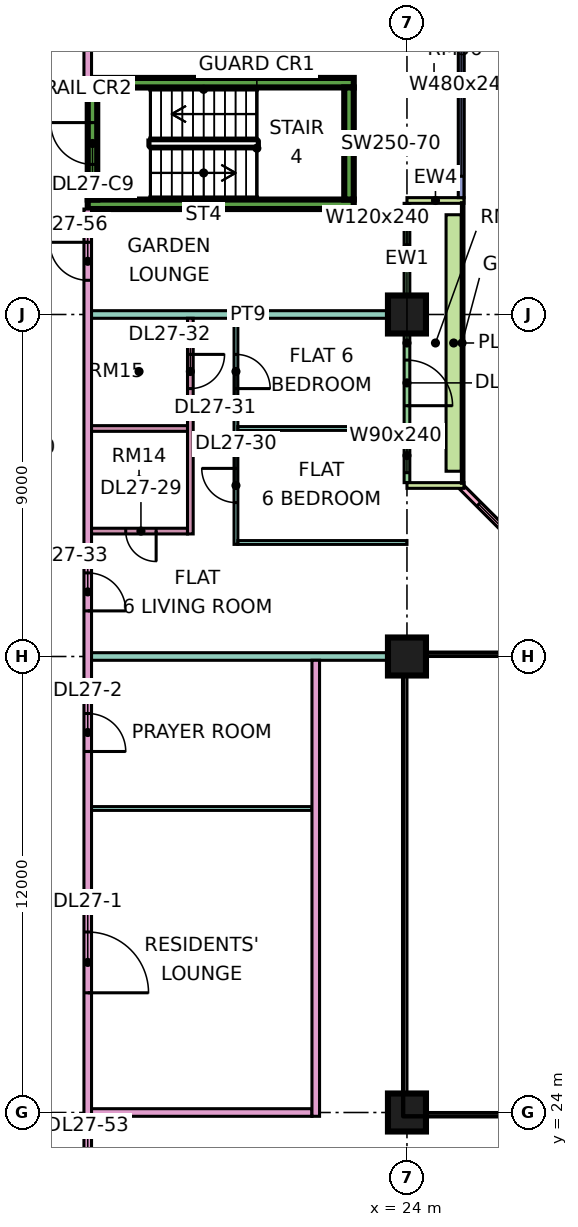
"""IFC4 building model, lengths in metres.
Left out: names, types, materials, properties, quantities, classifications, styles, units other than length and angle.
Written with IfcOpenShell. Run it as: python <this file> out.ifc"""

import sys

from ifc_helpers import new_model, si_unit, direction, frame, frame_2d, origin, origin_2d, place, context, subcontext, project, spatial, rectangle, extrude, element, fill, save


model = new_model("IFC4")
c1 = context("Model", 3, precision=1e-05, world=origin(), true_north=direction((0.0, 1.0)))
c2 = subcontext(c1, "Body", "Model", "MODEL_VIEW")
j1 = project(units=[si_unit("LENGTHUNIT", "METRE"), si_unit("PLANEANGLEUNIT", "RADIAN")], contexts=[c1])
p1 = place(None, origin())
s1 = spatial("IfcSite", under=j1, at=p1, CompositionType="ELEMENT")
p2 = place(p1, origin())
s2 = spatial("IfcBuilding", under=s1, at=p2, CompositionType="ELEMENT")
p3 = place(p2, frame((0.0, 0.0, 118.15)))
s3 = spatial("IfcBuildingStorey", under=s2, at=p3, CompositionType="ELEMENT", Elevation=118.15)
for number, where, z_axis, x_axis in (
    (1, (24.0, 24.0, 0.0), (0.0, 0.0, 1.0), (1.0, 0.0, 0.0)),
    (2, (24.0, 36.0, 0.0), (0.0, 0.0, 1.0), (1.0, 0.0, 0.0)),
    (3, (24.0, 45.0, 0.0), (0.0, 0.0, 1.0), (1.0, 0.0, 0.0)),
):
    element("IfcColumn", number, at=place(p3, frame(where, z_axis=z_axis, x_axis=x_axis)), inside=s3, PredefinedType="COLUMN", context=c2, shape_type="SweptSolid", body=[
        extrude(rectangle(XDim=1.0, YDim=1.0, at=origin_2d()), origin(), (0.0, 0.0, 1.0), 3.75),
    ])
for number, where, z_axis, x_axis in (
    (4, (15.6, 47.9, 0.0), (0.0, 0.0, 1.0), (1.0, 0.0, 0.0)),
    (5, (15.6, 51.1, 0.0), (0.0, 0.0, 1.0), (1.0, 0.0, 0.0)),
):
    element("IfcWall", number, at=place(p3, frame(where, z_axis=z_axis, x_axis=x_axis)), inside=s3, PredefinedType="SHEAR", context=c2, shape_type="SweptSolid", body=[
        extrude(rectangle(XDim=7.0, YDim=0.25, at=frame_2d((3.5, 0.0))), origin(), (0.0, 0.0, 1.0), 3.75),
    ])
p4 = place(p3, frame((15.725, 48.025, 0.0), z_axis=(0.0, 0.0, 1.0), x_axis=(0.0, 1.0, 0.0)))
e6 = element("IfcWall", 6, at=p4, inside=s3, PredefinedType="SHEAR", context=c2, shape_type="SweptSolid", body=[
    extrude(rectangle(XDim=2.95, YDim=0.25, at=frame_2d((1.475, 0.0))), origin(), (0.0, 0.0, 1.0), 3.75),
])
p5 = place(p4, frame((0.925, 0.0, 0.0)))
e7 = element("IfcOpeningElement", 7, at=p5, cuts=e6, PredefinedType="OPENING", context=c2, shape_type="SweptSolid", body=[
    extrude(rectangle(XDim=1.1, YDim=2.2, at=frame_2d((0.55, 1.1))), frame((0.0, 0.135, 0.0), z_axis=(0.0, -1.0, 0.0), x_axis=(1.0, 0.0, 0.0)), (0.0, 0.0, 1.0), 0.27),
])
p6 = place(p3, frame((22.475, 48.025, 0.0), z_axis=(0.0, 0.0, 1.0), x_axis=(0.0, 1.0, 0.0)))
e8 = element("IfcWall", 8, at=p6, inside=s3, PredefinedType="SHEAR", context=c2, shape_type="SweptSolid", body=[
    extrude(rectangle(XDim=2.95, YDim=0.25, at=frame_2d((1.475, 0.0))), origin(), (0.0, 0.0, 1.0), 3.75),
])
p7 = place(p3, frame((28.447, 37.447, 0.0), z_axis=(0.0, 0.0, 1.0), x_axis=(-0.707106781187, 0.707106781187, 0.0)))
e9 = element("IfcWall", 9, at=p7, inside=s3, PredefinedType="SOLIDWALL", context=c2, shape_type="SweptSolid", body=[
    extrude(rectangle(XDim=4.243, YDim=0.15, at=frame_2d((2.121, 0.0))), origin(), (0.0, 0.0, 1.0), 3.35),
])
p8 = place(p7, frame((0.621, 0.0, 0.45)))
e10 = element("IfcOpeningElement", 10, at=p8, cuts=e9, PredefinedType="OPENING", context=c2, shape_type="SweptSolid", body=[
    extrude(rectangle(XDim=3.0, YDim=2.4, at=frame_2d((1.5, 1.2))), frame((0.0, 0.085, 0.0), z_axis=(0.0, -1.0, 0.0), x_axis=(1.0, 0.0, 0.0)), (0.0, 0.0, 1.0), 0.17),
])
p9 = place(p3, frame((24.0, 40.575, 0.0), z_axis=(0.0, 0.0, 1.0), x_axis=(0.0, 1.0, 0.0)))
e11 = element("IfcWall", 11, at=p9, inside=s3, PredefinedType="SOLIDWALL", context=c2, shape_type="SweptSolid", body=[
    extrude(rectangle(XDim=7.35, YDim=0.15, at=frame_2d((3.675, 0.0))), origin(), (0.0, 0.0, 1.0), 3.35),
])
p10 = place(p9, frame((0.262, 0.0, 0.45)))
e12 = element("IfcOpeningElement", 12, at=p10, cuts=e11, PredefinedType="OPENING", context=c2, shape_type="SweptSolid", body=[
    extrude(rectangle(XDim=0.9, YDim=2.4, at=frame_2d((0.45, 1.2))), frame((0.0, 0.085, 0.0), z_axis=(0.0, -1.0, 0.0), x_axis=(1.0, 0.0, 0.0)), (0.0, 0.0, 1.0), 0.17),
])
p11 = place(p9, frame((2.025, 0.0, 0.0)))
e13 = element("IfcOpeningElement", 13, at=p11, cuts=e11, PredefinedType="OPENING", context=c2, shape_type="SweptSolid", body=[
    extrude(rectangle(XDim=1.2, YDim=2.4, at=frame_2d((0.6, 1.2))), frame((0.0, 0.085, 0.0), z_axis=(0.0, -1.0, 0.0), x_axis=(1.0, 0.0, 0.0)), (0.0, 0.0, 1.0), 0.17),
])
p12 = place(p9, frame((5.587, 0.0, 0.45)))
e14 = element("IfcOpeningElement", 14, at=p12, cuts=e11, PredefinedType="OPENING", context=c2, shape_type="SweptSolid", body=[
    extrude(rectangle(XDim=1.2, YDim=2.4, at=frame_2d((0.6, 1.2))), frame((0.0, 0.085, 0.0), z_axis=(0.0, -1.0, 0.0), x_axis=(1.0, 0.0, 0.0)), (0.0, 0.0, 1.0), 0.17),
])
for number, where, z_axis, x_axis in (
    (15, (25.5, 40.5, 0.0), (0.0, 0.0, 1.0), (-1.0, 0.0, 0.0)),
    (16, (25.5, 48.0, 0.0), (0.0, 0.0, 1.0), (-1.0, 0.0, 0.0)),
):
    element("IfcWall", number, at=place(p3, frame(where, z_axis=z_axis, x_axis=x_axis)), inside=s3, PredefinedType="SOLIDWALL", context=c2, shape_type="SweptSolid", body=[
        extrude(rectangle(XDim=1.5, YDim=0.15, at=frame_2d((0.75, 0.0))), origin(), (0.0, 0.0, 1.0), 3.35),
    ])
p13 = place(p3, frame((25.425, 48.075, 0.0), z_axis=(0.0, 0.0, 1.0), x_axis=(0.0, 1.0, 0.0)))
e17 = element("IfcWall", 17, at=p13, inside=s3, PredefinedType="SOLIDWALL", context=c2, shape_type="SweptSolid", body=[
    extrude(rectangle(XDim=13.425, YDim=0.15, at=frame_2d((6.712, 0.0))), origin(), (0.0, 0.0, 1.0), 3.35),
])
p14 = place(p13, frame((0.562, 0.0, 0.45)))
e18 = element("IfcOpeningElement", 18, at=p14, cuts=e17, PredefinedType="OPENING", context=c2, shape_type="SweptSolid", body=[
    extrude(rectangle(XDim=4.8, YDim=2.4, at=frame_2d((2.4, 1.2))), frame((0.0, 0.085, 0.0), z_axis=(0.0, -1.0, 0.0), x_axis=(1.0, 0.0, 0.0)), (0.0, 0.0, 1.0), 0.17),
])
p15 = place(p13, frame((6.525, 0.0, 0.45)))
e19 = element("IfcOpeningElement", 19, at=p15, cuts=e17, PredefinedType="OPENING", context=c2, shape_type="SweptSolid", body=[
    extrude(rectangle(XDim=1.8, YDim=2.4, at=frame_2d((0.9, 1.2))), frame((0.0, 0.085, 0.0), z_axis=(0.0, -1.0, 0.0), x_axis=(1.0, 0.0, 0.0)), (0.0, 0.0, 1.0), 0.17),
])
p16 = place(p13, frame((9.525, 0.0, 0.45)))
e20 = element("IfcOpeningElement", 20, at=p16, cuts=e17, PredefinedType="OPENING", context=c2, shape_type="SweptSolid", body=[
    extrude(rectangle(XDim=1.8, YDim=2.4, at=frame_2d((0.9, 1.2))), frame((0.0, 0.085, 0.0), z_axis=(0.0, -1.0, 0.0), x_axis=(1.0, 0.0, 0.0)), (0.0, 0.0, 1.0), 0.17),
])
p17 = place(p13, frame((12.225, 0.0, 0.45)))
e21 = element("IfcOpeningElement", 21, at=p17, cuts=e17, PredefinedType="OPENING", context=c2, shape_type="SweptSolid", body=[
    extrude(rectangle(XDim=0.9, YDim=2.4, at=frame_2d((0.45, 1.2))), frame((0.0, 0.085, 0.0), z_axis=(0.0, -1.0, 0.0), x_axis=(1.0, 0.0, 0.0)), (0.0, 0.0, 1.0), 0.17),
])
p18 = place(p3, frame((25.229, 40.875, 0.0), z_axis=(0.0, 0.0, 1.0), x_axis=(0.0, 1.0, 0.0)))
e22 = element("IfcWall", 22, at=p18, inside=s3, PredefinedType="SOLIDWALL", context=c2, shape_type="SweptSolid", body=[
    extrude(rectangle(XDim=6.75, YDim=0.4, at=frame_2d((3.375, 0.0))), origin(), (0.0, 0.0, 1.0), 0.7),
])
p19 = place(p3, frame((15.6, 20.0, 0.0), z_axis=(0.0, 0.0, 1.0), x_axis=(0.0, 1.0, 0.0)))
e23 = element("IfcWall", 23, at=p19, inside=s3, PredefinedType="PARTITIONING", context=c2, shape_type="SweptSolid", body=[
    extrude(rectangle(XDim=27.775, YDim=0.2, at=frame_2d((13.887, 0.0))), origin(), (0.0, 0.0, 1.0), 3.35),
])
p20 = place(p19, frame((7.15, 0.0, 0.0)))
e24 = element("IfcOpeningElement", 24, at=p20, cuts=e23, PredefinedType="OPENING", context=c2, shape_type="SweptSolid", body=[
    extrude(rectangle(XDim=1.6, YDim=2.1, at=frame_2d((0.8, 1.05))), frame((0.0, 0.11, 0.0), z_axis=(0.0, -1.0, 0.0), x_axis=(1.0, 0.0, 0.0)), (0.0, 0.0, 1.0), 0.22),
])
p21 = place(p19, frame((13.5, 0.0, 0.0)))
e25 = element("IfcOpeningElement", 25, at=p21, cuts=e23, PredefinedType="OPENING", context=c2, shape_type="SweptSolid", body=[
    extrude(rectangle(XDim=1.0, YDim=2.1, at=frame_2d((0.5, 1.05))), frame((0.0, 0.11, 0.0), z_axis=(0.0, -1.0, 0.0), x_axis=(1.0, 0.0, 0.0)), (0.0, 0.0, 1.0), 0.22),
])
p22 = place(p19, frame((17.2, 0.0, 0.0)))
e26 = element("IfcOpeningElement", 26, at=p22, cuts=e23, PredefinedType="OPENING", context=c2, shape_type="SweptSolid", body=[
    extrude(rectangle(XDim=1.0, YDim=2.1, at=frame_2d((0.5, 1.05))), frame((0.0, 0.11, 0.0), z_axis=(0.0, -1.0, 0.0), x_axis=(1.0, 0.0, 0.0)), (0.0, 0.0, 1.0), 0.22),
])
p23 = place(p19, frame((1.15, 0.0, 0.0)))
e27 = element("IfcOpeningElement", 27, at=p23, cuts=e23, PredefinedType="OPENING", context=c2, shape_type="SweptSolid", body=[
    extrude(rectangle(XDim=1.8, YDim=2.1, at=frame_2d((0.9, 1.05))), frame((0.0, 0.11, 0.0), z_axis=(0.0, -1.0, 0.0), x_axis=(1.0, 0.0, 0.0)), (0.0, 0.0, 1.0), 0.22),
])
p24 = place(p19, frame((25.9, 0.0, 0.0)))
e28 = element("IfcOpeningElement", 28, at=p24, cuts=e23, PredefinedType="OPENING", context=c2, shape_type="SweptSolid", body=[
    extrude(rectangle(XDim=1.0, YDim=2.1, at=frame_2d((0.5, 1.05))), frame((0.0, 0.11, 0.0), z_axis=(0.0, -1.0, 0.0), x_axis=(1.0, 0.0, 0.0)), (0.0, 0.0, 1.0), 0.22),
])
p25 = place(p3, frame((15.6, 51.225, 0.0), z_axis=(0.0, 0.0, 1.0), x_axis=(0.0, 1.0, 0.0)))
e29 = element("IfcWall", 29, at=p25, inside=s3, PredefinedType="PARTITIONING", context=c2, shape_type="SweptSolid", body=[
    extrude(rectangle(XDim=11.701, YDim=0.2, at=frame_2d((5.851, 0.0))), origin(), (0.0, 0.0, 1.0), 3.35),
])
p26 = place(p25, frame((9.975, 0.0, 0.0)))
e30 = element("IfcOpeningElement", 30, at=p26, cuts=e29, PredefinedType="OPENING", context=c2, shape_type="SweptSolid", body=[
    extrude(rectangle(XDim=1.0, YDim=2.1, at=frame_2d((0.5, 1.05))), frame((0.0, 0.11, 0.0), z_axis=(0.0, -1.0, 0.0), x_axis=(1.0, 0.0, 0.0)), (0.0, 0.0, 1.0), 0.22),
])
p27 = place(p3, frame((15.7, 24.0, 0.0), z_axis=(0.0, 0.0, 1.0), x_axis=(1.0, 0.0, 0.0)))
e31 = element("IfcWall", 31, at=p27, inside=s3, PredefinedType="PARTITIONING", context=c2, shape_type="SweptSolid", body=[
    extrude(rectangle(XDim=5.8, YDim=0.2, at=frame_2d((2.9, 0.0))), origin(), (0.0, 0.0, 1.0), 3.35),
])
p28 = place(p3, frame((15.7, 32.0, 0.0), z_axis=(0.0, 0.0, 1.0), x_axis=(1.0, 0.0, 0.0)))
e32 = element("IfcWall", 32, at=p28, inside=s3, PredefinedType="PARTITIONING", context=c2, shape_type="SweptSolid", body=[
    extrude(rectangle(XDim=5.8, YDim=0.1, at=frame_2d((2.9, 0.0))), origin(), (0.0, 0.0, 1.0), 3.35),
])
p29 = place(p3, frame((15.7, 36.0, 0.0), z_axis=(0.0, 0.0, 1.0), x_axis=(1.0, 0.0, 0.0)))
e33 = element("IfcWall", 33, at=p29, inside=s3, PredefinedType="PARTITIONING", context=c2, shape_type="SweptSolid", body=[
    extrude(rectangle(XDim=8.3, YDim=0.2, at=frame_2d((4.15, 0.0))), origin(), (0.0, 0.0, 1.0), 3.35),
])
p30 = place(p3, frame((15.7, 39.3, 0.0), z_axis=(0.0, 0.0, 1.0), x_axis=(1.0, 0.0, 0.0)))
e34 = element("IfcWall", 34, at=p30, inside=s3, PredefinedType="PARTITIONING", context=c2, shape_type="SweptSolid", body=[
    extrude(rectangle(XDim=2.525, YDim=0.15, at=frame_2d((1.263, 0.0))), origin(), (0.0, 0.0, 1.0), 3.35),
])
p31 = place(p30, frame((0.9, 0.0, 0.0)))
e35 = element("IfcOpeningElement", 35, at=p31, cuts=e34, PredefinedType="OPENING", context=c2, shape_type="SweptSolid", body=[
    extrude(rectangle(XDim=0.8, YDim=2.1, at=frame_2d((0.4, 1.05))), frame((0.0, 0.085, 0.0), z_axis=(0.0, -1.0, 0.0), x_axis=(1.0, 0.0, 0.0)), (0.0, 0.0, 1.0), 0.17),
])
p32 = place(p3, frame((15.7, 42.0, 0.0), z_axis=(0.0, 0.0, 1.0), x_axis=(1.0, 0.0, 0.0)))
e36 = element("IfcWall", 36, at=p32, inside=s3, PredefinedType="PARTITIONING", context=c2, shape_type="SweptSolid", body=[
    extrude(rectangle(XDim=2.525, YDim=0.15, at=frame_2d((1.263, 0.0))), origin(), (0.0, 0.0, 1.0), 3.35),
])
p33 = place(p3, frame((15.7, 45.0, 0.0), z_axis=(0.0, 0.0, 1.0), x_axis=(1.0, 0.0, 0.0)))
e37 = element("IfcWall", 37, at=p33, inside=s3, PredefinedType="PARTITIONING", context=c2, shape_type="SweptSolid", body=[
    extrude(rectangle(XDim=8.226, YDim=0.2, at=frame_2d((4.113, 0.0))), origin(), (0.0, 0.0, 1.0), 3.35),
])
p34 = place(p3, frame((18.3, 39.225, 0.0), z_axis=(0.0, 0.0, 1.0), x_axis=(0.0, 1.0, 0.0)))
e38 = element("IfcWall", 38, at=p34, inside=s3, PredefinedType="PARTITIONING", context=c2, shape_type="SweptSolid", body=[
    extrude(rectangle(XDim=5.675, YDim=0.15, at=frame_2d((2.837, 0.0))), origin(), (0.0, 0.0, 1.0), 3.35),
])
p35 = place(p34, frame((3.825, 0.0, 0.0)))
e39 = element("IfcOpeningElement", 39, at=p35, cuts=e38, PredefinedType="OPENING", context=c2, shape_type="SweptSolid", body=[
    extrude(rectangle(XDim=0.9, YDim=2.1, at=frame_2d((0.45, 1.05))), frame((0.0, 0.085, 0.0), z_axis=(0.0, -1.0, 0.0), x_axis=(1.0, 0.0, 0.0)), (0.0, 0.0, 1.0), 0.17),
])
p36 = place(p3, frame((19.5, 38.95, 0.0), z_axis=(0.0, 0.0, 1.0), x_axis=(0.0, 1.0, 0.0)))
e40 = element("IfcWall", 40, at=p36, inside=s3, PredefinedType="PARTITIONING", context=c2, shape_type="SweptSolid", body=[
    extrude(rectangle(XDim=5.95, YDim=0.1, at=frame_2d((2.975, 0.0))), origin(), (0.0, 0.0, 1.0), 3.35),
])
p37 = place(p36, frame((1.1, 0.0, 0.0)))
e41 = element("IfcOpeningElement", 41, at=p37, cuts=e40, PredefinedType="OPENING", context=c2, shape_type="SweptSolid", body=[
    extrude(rectangle(XDim=0.9, YDim=2.1, at=frame_2d((0.45, 1.05))), frame((0.0, 0.06, 0.0), z_axis=(0.0, -1.0, 0.0), x_axis=(1.0, 0.0, 0.0)), (0.0, 0.0, 1.0), 0.12),
])
p38 = place(p36, frame((4.1, 0.0, 0.0)))
e42 = element("IfcOpeningElement", 42, at=p38, cuts=e40, PredefinedType="OPENING", context=c2, shape_type="SweptSolid", body=[
    extrude(rectangle(XDim=0.9, YDim=2.1, at=frame_2d((0.45, 1.05))), frame((0.0, 0.06, 0.0), z_axis=(0.0, -1.0, 0.0), x_axis=(1.0, 0.0, 0.0)), (0.0, 0.0, 1.0), 0.12),
])
p39 = place(p3, frame((19.55, 39.0, 0.0), z_axis=(0.0, 0.0, 1.0), x_axis=(1.0, 0.0, 0.0)))
e43 = element("IfcWall", 43, at=p39, inside=s3, PredefinedType="PARTITIONING", context=c2, shape_type="SweptSolid", body=[
    extrude(rectangle(XDim=4.45, YDim=0.1, at=frame_2d((2.225, 0.0))), origin(), (0.0, 0.0, 1.0), 3.35),
])
p40 = place(p3, frame((19.55, 42.0, 0.0), z_axis=(0.0, 0.0, 1.0), x_axis=(1.0, 0.0, 0.0)))
e44 = element("IfcWall", 44, at=p40, inside=s3, PredefinedType="PARTITIONING", context=c2, shape_type="SweptSolid", body=[
    extrude(rectangle(XDim=4.376, YDim=0.1, at=frame_2d((2.188, 0.0))), origin(), (0.0, 0.0, 1.0), 3.35),
])
p41 = place(p3, frame((21.6, 23.9, 0.0), z_axis=(0.0, 0.0, 1.0), x_axis=(0.0, 1.0, 0.0)))
e45 = element("IfcWall", 45, at=p41, inside=s3, PredefinedType="PARTITIONING", context=c2, shape_type="SweptSolid", body=[
    extrude(rectangle(XDim=12.0, YDim=0.2, at=frame_2d((6.0, 0.0))), origin(), (0.0, 0.0, 1.0), 3.35),
])
p42 = place(p8, origin())
e46 = element("IfcWindow", 46, at=p42, inside=s3, PartitioningType="SINGLE_PANEL", PredefinedType="WINDOW", context=c2, shape_type="SweptSolid", body=[
    extrude(rectangle(XDim=3.0, YDim=2.4, at=frame_2d((1.5, 1.2))), frame((0.0, 0.03, 0.0), z_axis=(0.0, -1.0, 0.0), x_axis=(1.0, 0.0, 0.0)), (0.0, 0.0, 1.0), 0.06),
])
fill(e10, e46)
p43 = place(p10, origin())
e47 = element("IfcWindow", 47, at=p43, inside=s3, PartitioningType="SINGLE_PANEL", PredefinedType="WINDOW", context=c2, shape_type="SweptSolid", body=[
    extrude(rectangle(XDim=0.9, YDim=2.4, at=frame_2d((0.45, 1.2))), frame((0.0, 0.03, 0.0), z_axis=(0.0, -1.0, 0.0), x_axis=(1.0, 0.0, 0.0)), (0.0, 0.0, 1.0), 0.06),
])
fill(e12, e47)
p44 = place(p11, frame((1.2, 0.0, 0.0), z_axis=(0.0, 0.0, 1.0), x_axis=(-1.0, 0.0, 0.0)))
e48 = element("IfcDoor", 48, at=p44, inside=s3, OperationType="DOUBLE_DOOR_SINGLE_SWING", PredefinedType="DOOR", context=c2, shape_type="SweptSolid", body=[
    extrude(rectangle(XDim=1.2, YDim=2.4, at=frame_2d((0.6, 1.2))), frame((0.0, 0.025, 0.0), z_axis=(0.0, -1.0, 0.0), x_axis=(1.0, 0.0, 0.0)), (0.0, 0.0, 1.0), 0.05),
])
fill(e13, e48)
p45 = place(p12, origin())
e49 = element("IfcWindow", 49, at=p45, inside=s3, PartitioningType="SINGLE_PANEL", PredefinedType="WINDOW", context=c2, shape_type="SweptSolid", body=[
    extrude(rectangle(XDim=1.2, YDim=2.4, at=frame_2d((0.6, 1.2))), frame((0.0, 0.03, 0.0), z_axis=(0.0, -1.0, 0.0), x_axis=(1.0, 0.0, 0.0)), (0.0, 0.0, 1.0), 0.06),
])
fill(e14, e49)
p46 = place(p14, origin())
e50 = element("IfcWindow", 50, at=p46, inside=s3, PartitioningType="SINGLE_PANEL", PredefinedType="WINDOW", context=c2, shape_type="SweptSolid", body=[
    extrude(rectangle(XDim=4.8, YDim=2.4, at=frame_2d((2.4, 1.2))), frame((0.0, 0.03, 0.0), z_axis=(0.0, -1.0, 0.0), x_axis=(1.0, 0.0, 0.0)), (0.0, 0.0, 1.0), 0.06),
])
fill(e18, e50)
p47 = place(p5, frame((1.1, 0.0, 0.0), z_axis=(0.0, 0.0, 1.0), x_axis=(-1.0, 0.0, 0.0)))
e51 = element("IfcDoor", 51, at=p47, inside=s3, OperationType="SINGLE_SWING_RIGHT", PredefinedType="DOOR", context=c2, shape_type="SweptSolid", body=[
    extrude(rectangle(XDim=1.1, YDim=2.2, at=frame_2d((0.55, 1.1))), frame((0.0, 0.025, 0.0), z_axis=(0.0, -1.0, 0.0), x_axis=(1.0, 0.0, 0.0)), (0.0, 0.0, 1.0), 0.05),
])
fill(e7, e51)
p48 = place(p20, frame((1.6, 0.0, 0.0), z_axis=(0.0, 0.0, 1.0), x_axis=(-1.0, 0.0, 0.0)))
e52 = element("IfcDoor", 52, at=p48, inside=s3, OperationType="DOUBLE_DOOR_SINGLE_SWING", PredefinedType="DOOR", context=c2, shape_type="SweptSolid", body=[
    extrude(rectangle(XDim=1.6, YDim=2.1, at=frame_2d((0.8, 1.05))), frame((0.0, 0.025, 0.0), z_axis=(0.0, -1.0, 0.0), x_axis=(1.0, 0.0, 0.0)), (0.0, 0.0, 1.0), 0.05),
])
fill(e24, e52)
p49 = place(p21, frame((1.0, 0.0, 0.0), z_axis=(0.0, 0.0, 1.0), x_axis=(-1.0, 0.0, 0.0)))
e53 = element("IfcDoor", 53, at=p49, inside=s3, OperationType="SINGLE_SWING_LEFT", PredefinedType="DOOR", context=c2, shape_type="SweptSolid", body=[
    extrude(rectangle(XDim=1.0, YDim=2.1, at=frame_2d((0.5, 1.05))), frame((0.0, 0.025, 0.0), z_axis=(0.0, -1.0, 0.0), x_axis=(1.0, 0.0, 0.0)), (0.0, 0.0, 1.0), 0.05),
])
fill(e25, e53)
p50 = place(p31, origin())
e54 = element("IfcDoor", 54, at=p50, inside=s3, OperationType="SINGLE_SWING_RIGHT", PredefinedType="DOOR", context=c2, shape_type="SweptSolid", body=[
    extrude(rectangle(XDim=0.8, YDim=2.1, at=frame_2d((0.4, 1.05))), frame((0.0, 0.025, 0.0), z_axis=(0.0, -1.0, 0.0), x_axis=(1.0, 0.0, 0.0)), (0.0, 0.0, 1.0), 0.05),
])
fill(e35, e54)
p51 = place(p37, frame((0.9, 0.0, 0.0), z_axis=(0.0, 0.0, 1.0), x_axis=(-1.0, 0.0, 0.0)))
e55 = element("IfcDoor", 55, at=p51, inside=s3, OperationType="SINGLE_SWING_RIGHT", PredefinedType="DOOR", context=c2, shape_type="SweptSolid", body=[
    extrude(rectangle(XDim=0.9, YDim=2.1, at=frame_2d((0.45, 1.05))), frame((0.0, 0.025, 0.0), z_axis=(0.0, -1.0, 0.0), x_axis=(1.0, 0.0, 0.0)), (0.0, 0.0, 1.0), 0.05),
])
fill(e41, e55)
p52 = place(p38, frame((0.9, 0.0, 0.0), z_axis=(0.0, 0.0, 1.0), x_axis=(-1.0, 0.0, 0.0)))
e56 = element("IfcDoor", 56, at=p52, inside=s3, OperationType="SINGLE_SWING_LEFT", PredefinedType="DOOR", context=c2, shape_type="SweptSolid", body=[
    extrude(rectangle(XDim=0.9, YDim=2.1, at=frame_2d((0.45, 1.05))), frame((0.0, 0.025, 0.0), z_axis=(0.0, -1.0, 0.0), x_axis=(1.0, 0.0, 0.0)), (0.0, 0.0, 1.0), 0.05),
])
fill(e42, e56)
p53 = place(p35, origin())
e57 = element("IfcDoor", 57, at=p53, inside=s3, OperationType="SINGLE_SWING_RIGHT", PredefinedType="DOOR", context=c2, shape_type="SweptSolid", body=[
    extrude(rectangle(XDim=0.9, YDim=2.1, at=frame_2d((0.45, 1.05))), frame((0.0, 0.025, 0.0), z_axis=(0.0, -1.0, 0.0), x_axis=(1.0, 0.0, 0.0)), (0.0, 0.0, 1.0), 0.05),
])
fill(e39, e57)
p54 = place(p22, frame((1.0, 0.0, 0.0), z_axis=(0.0, 0.0, 1.0), x_axis=(-1.0, 0.0, 0.0)))
e58 = element("IfcDoor", 58, at=p54, inside=s3, OperationType="SINGLE_SWING_LEFT", PredefinedType="DOOR", context=c2, shape_type="SweptSolid", body=[
    extrude(rectangle(XDim=1.0, YDim=2.1, at=frame_2d((0.5, 1.05))), frame((0.0, 0.025, 0.0), z_axis=(0.0, -1.0, 0.0), x_axis=(1.0, 0.0, 0.0)), (0.0, 0.0, 1.0), 0.05),
])
fill(e26, e58)
p55 = place(p24, frame((1.0, 0.0, 0.0), z_axis=(0.0, 0.0, 1.0), x_axis=(-1.0, 0.0, 0.0)))
e59 = element("IfcDoor", 59, at=p55, inside=s3, OperationType="SINGLE_SWING_RIGHT", PredefinedType="DOOR", context=c2, shape_type="SweptSolid", body=[
    extrude(rectangle(XDim=1.0, YDim=2.1, at=frame_2d((0.5, 1.05))), frame((0.0, 0.025, 0.0), z_axis=(0.0, -1.0, 0.0), x_axis=(1.0, 0.0, 0.0)), (0.0, 0.0, 1.0), 0.05),
])
fill(e28, e59)
save(model, sys.argv[1])
